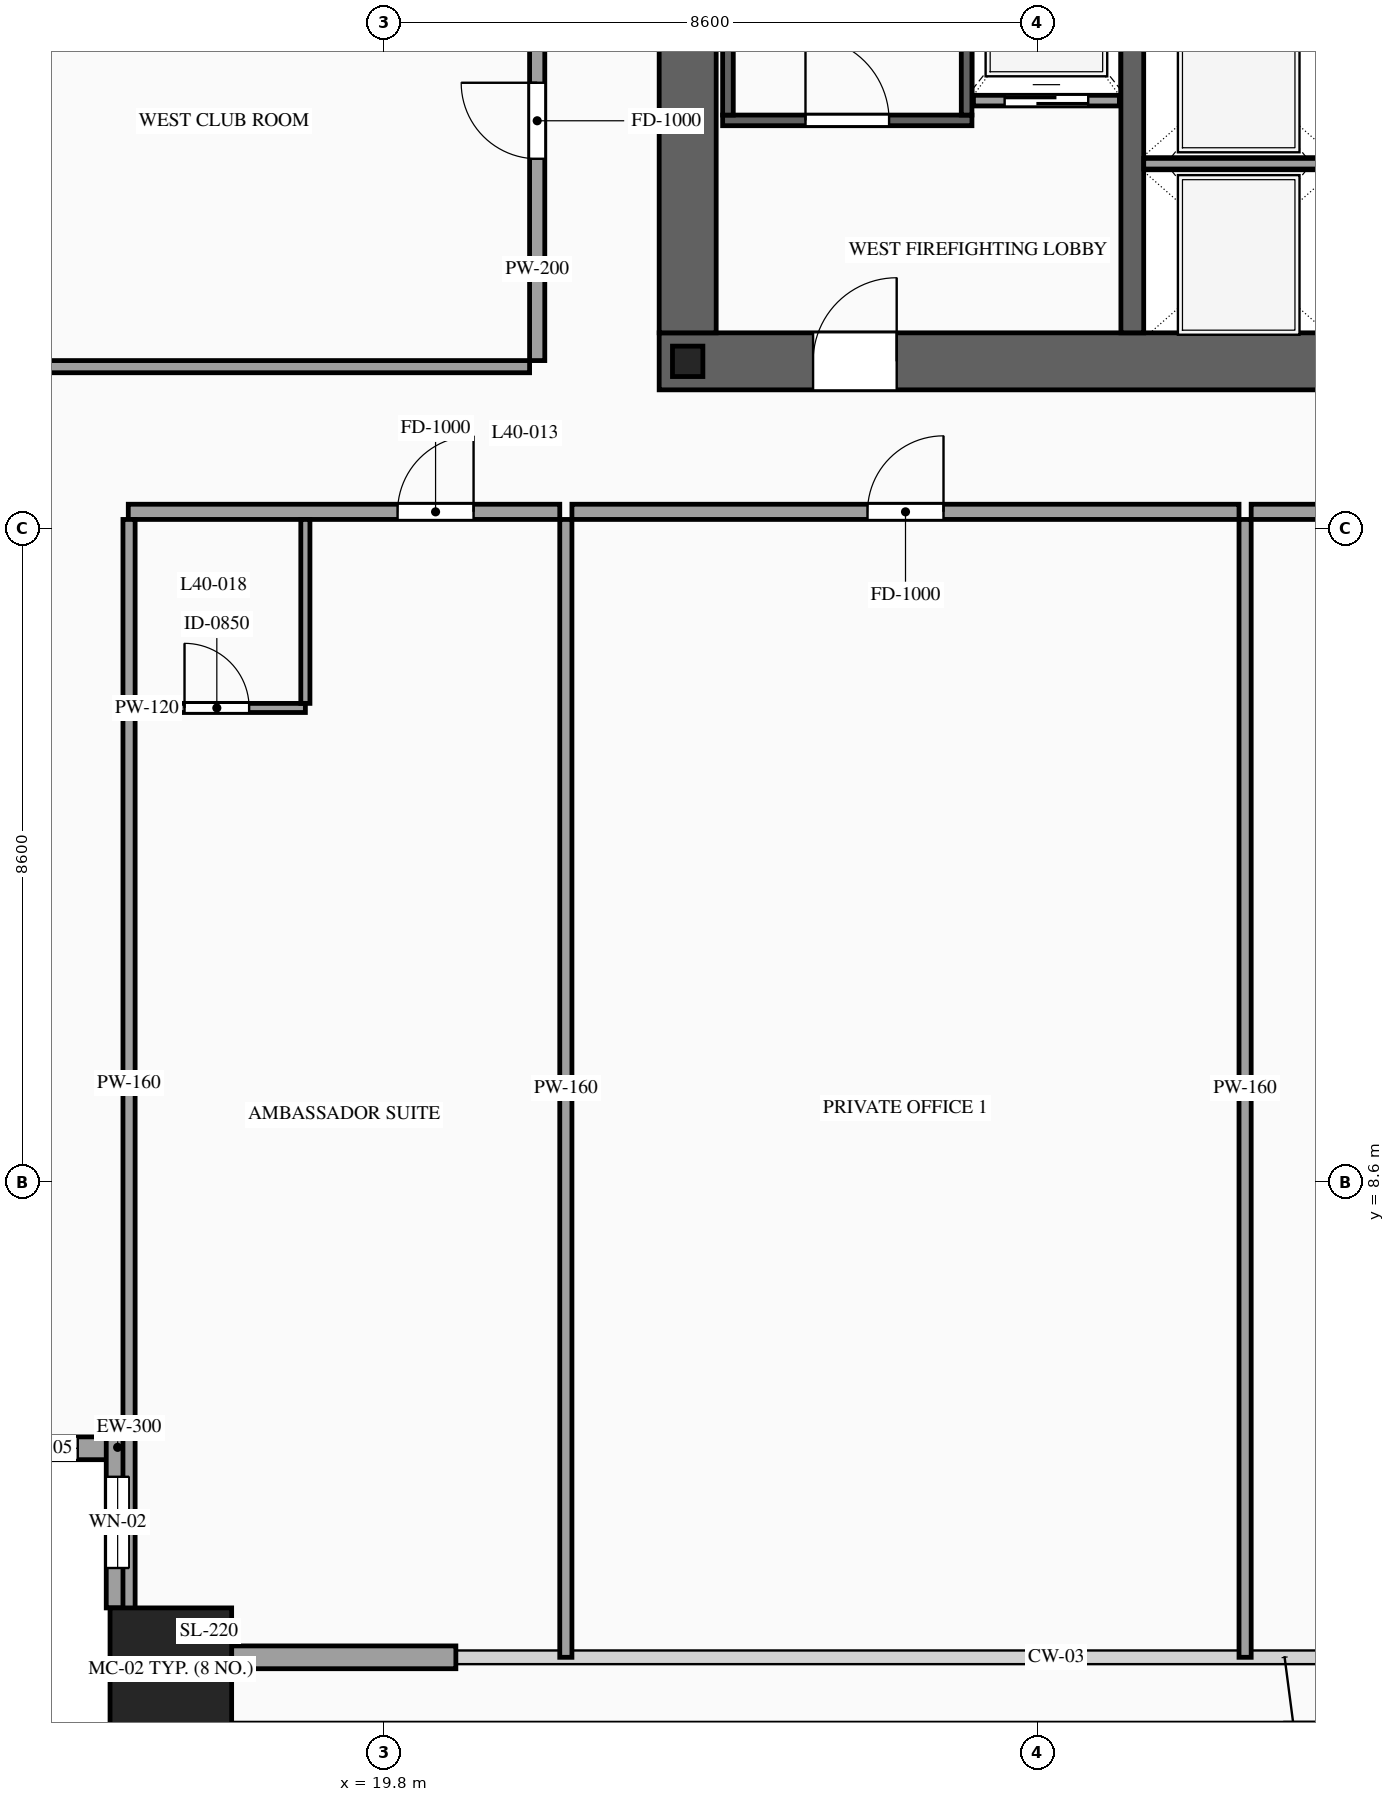
"""IFC4 building model, lengths in metres.
Left out: names, types, materials, properties, quantities, classifications, styles, units other than length and angle.
Written with IfcOpenShell. Run it as: python <this file> out.ifc"""

import sys

from ifc_helpers import new_model, si_unit, direction, frame, frame_2d, origin, origin_2d, place, context, subcontext, project, spatial, rectangle, hollow_rectangle, i_section, extrude, source, transform, mapped, element, fill, save


model = new_model("IFC4")
c1 = context("Model", 3, precision=1e-05, world=origin(), true_north=direction((0.0, 1.0)))
c2 = subcontext(c1, "Body", "Model", "MODEL_VIEW")
j1 = project(units=[si_unit("LENGTHUNIT", "METRE"), si_unit("PLANEANGLEUNIT", "RADIAN")], contexts=[c1])
p1 = place(None, origin())
s1 = spatial("IfcSite", under=j1, at=p1, CompositionType="ELEMENT")
p2 = place(p1, origin())
s2 = spatial("IfcBuilding", under=s1, at=p2, CompositionType="ELEMENT")
p3 = place(p2, frame((0.0, 0.0, 152.4)))
s3 = spatial("IfcBuildingStorey", under=s2, at=p3, CompositionType="ELEMENT", Elevation=152.4)
p4 = place(p3, frame((23.425, 19.4, 0.0), z_axis=(0.0, 0.0, 1.0), x_axis=(1.0, 0.0, 0.0)))
e1 = element("IfcWall", 1, at=p4, inside=s3, PredefinedType="SHEAR", context=c2, shape_type="SweptSolid", body=[
    extrude(rectangle(XDim=27.15, YDim=0.75, at=frame_2d((13.575, 0.0))), origin(), (0.0, 0.0, 1.0), 3.6),
])
p5 = place(p4, frame((2.025, 0.0, 0.0)))
e2 = element("IfcOpeningElement", 2, at=p5, cuts=e1, PredefinedType="OPENING", context=c2, shape_type="SweptSolid", body=[
    extrude(rectangle(XDim=1.1, YDim=2.2, at=frame_2d((0.55, 1.1))), frame((0.0, 0.39, 0.0), z_axis=(0.0, -1.0, 0.0), x_axis=(1.0, 0.0, 0.0)), (0.0, 0.0, 1.0), 0.78),
])
p6 = place(p4, frame((9.925, 0.0, 0.0)))
e3 = element("IfcOpeningElement", 3, at=p6, cuts=e1, PredefinedType="OPENING", context=c2, shape_type="SweptSolid", body=[
    extrude(rectangle(XDim=1.1, YDim=2.2, at=frame_2d((0.55, 1.1))), frame((0.0, 0.39, 0.0), z_axis=(0.0, -1.0, 0.0), x_axis=(1.0, 0.0, 0.0)), (0.0, 0.0, 1.0), 0.78),
])
p7 = place(p4, frame((23.125, 0.0, 0.0)))
e4 = element("IfcOpeningElement", 4, at=p7, cuts=e1, PredefinedType="OPENING", context=c2, shape_type="SweptSolid", body=[
    extrude(rectangle(XDim=1.1, YDim=2.2, at=frame_2d((0.55, 1.1))), frame((0.0, 0.39, 0.0), z_axis=(0.0, -1.0, 0.0), x_axis=(1.0, 0.0, 0.0)), (0.0, 0.0, 1.0), 0.78),
])
p8 = place(p4, frame((19.745, 0.0, 0.0)))
e5 = element("IfcOpeningElement", 5, at=p8, cuts=e1, PredefinedType="OPENING", context=c2, shape_type="SweptSolid", body=[
    extrude(rectangle(XDim=0.9, YDim=2.15, at=frame_2d((0.45, 1.075))), frame((0.0, 0.39, 0.0), z_axis=(0.0, -1.0, 0.0), x_axis=(1.0, 0.0, 0.0)), (0.0, 0.0, 1.0), 0.78),
])
p9 = place(p4, frame((18.305, 0.0, 0.0)))
e6 = element("IfcOpeningElement", 6, at=p9, cuts=e1, PredefinedType="OPENING", context=c2, shape_type="SweptSolid", body=[
    extrude(rectangle(XDim=0.9, YDim=2.15, at=frame_2d((0.45, 1.075))), frame((0.0, 0.39, 0.0), z_axis=(0.0, -1.0, 0.0), x_axis=(1.0, 0.0, 0.0)), (0.0, 0.0, 1.0), 0.78),
])
m1 = source(origin(), c2, "Body", "SweptSolid", [
    extrude(rectangle(XDim=12.05, YDim=0.75, at=frame_2d((6.025, 0.0))), origin(), (0.0, 0.0, 1.0), 3.6),
])
p10 = place(p3, frame((23.8, 19.775, 0.0), z_axis=(0.0, 0.0, 1.0), x_axis=(0.0, 1.0, 0.0)))
e7 = element("IfcWall", 7, at=p10, inside=s3, PredefinedType="SHEAR", context=c2, shape_type="MappedRepresentation", body=[
    mapped(m1, transform((0.0, 0.0, 0.0), scale=1.0)),
])
m2 = source(origin(), c2, "Body", "SweptSolid", [
    extrude(rectangle(XDim=12.05, YDim=0.3, at=frame_2d((6.025, 0.0))), origin(), (0.0, 0.0, 1.0), 3.6),
])
p11 = place(p3, frame((29.65, 19.775, 0.0), z_axis=(0.0, 0.0, 1.0), x_axis=(0.0, 1.0, 0.0)))
e8 = element("IfcWall", 8, at=p11, inside=s3, PredefinedType="SOLIDWALL", context=c2, shape_type="MappedRepresentation", body=[
    mapped(m2, transform((0.0, 0.0, 0.0), scale=1.0)),
])
m3 = source(origin(), c2, "Body", "SweptSolid", [
    extrude(i_section(OverallWidth=0.4, OverallDepth=0.4, WebThickness=0.013, FlangeThickness=0.021, at=origin_2d()), origin(), (0.0, 0.0, 1.0), 3.6),
])
p12 = place(p3, frame((23.8, 19.4, 0.0), z_axis=(0.0, 0.0, 1.0), x_axis=(1.0, 0.0, 0.0)))
e9 = element("IfcColumn", 9, at=p12, inside=s3, PredefinedType="COLUMN", context=c2, shape_type="MappedRepresentation", body=[
    mapped(m3, transform((0.0, 0.0, 0.0), scale=1.0)),
])
m4 = source(origin(), c2, "Body", "SweptSolid", [
    extrude(hollow_rectangle(XDim=1.6, YDim=1.6, WallThickness=0.07, at=origin_2d()), origin(), (0.0, 0.0, 1.0), 3.6),
])
p13 = place(p3, frame((17.0, 2.2, 0.0), z_axis=(0.0, 0.0, 1.0), x_axis=(1.0, 0.0, 0.0)))
e10 = element("IfcColumn", 10, at=p13, inside=s3, PredefinedType="COLUMN", context=c2, shape_type="MappedRepresentation", body=[
    mapped(m4, transform((0.0, 0.0, 0.0), scale=1.0)),
])
p14 = place(p3, frame((14.2, 5.1, 0.0), z_axis=(0.0, 0.0, 1.0), x_axis=(1.0, 0.0, 0.0)))
e11 = element("IfcWall", 11, at=p14, inside=s3, PredefinedType="SOLIDWALL", context=c2, shape_type="SweptSolid", body=[
    extrude(rectangle(XDim=2.25, YDim=0.3, at=frame_2d((1.125, 0.0))), origin(), (0.0, 0.0, 1.0), 3.38),
])
p15 = place(p14, frame((0.675, 0.0, 0.85)))
e12 = element("IfcOpeningElement", 12, at=p15, cuts=e11, PredefinedType="OPENING", context=c2, shape_type="SweptSolid", body=[
    extrude(rectangle(XDim=0.9, YDim=1.5, at=frame_2d((0.45, 0.75))), frame((0.0, 0.165, 0.0), z_axis=(0.0, -1.0, 0.0), x_axis=(1.0, 0.0, 0.0)), (0.0, 0.0, 1.0), 0.33),
])
p16 = place(p3, frame((16.3, 5.25, 0.0), z_axis=(0.0, 0.0, 1.0), x_axis=(0.0, -1.0, 0.0)))
e13 = element("IfcWall", 13, at=p16, inside=s3, PredefinedType="SOLIDWALL", context=c2, shape_type="SweptSolid", body=[
    extrude(rectangle(XDim=2.25, YDim=0.3, at=frame_2d((1.125, 0.0))), origin(), (0.0, 0.0, 1.0), 3.38),
])
p17 = place(p16, frame((0.525, 0.0, 0.85)))
e14 = element("IfcOpeningElement", 14, at=p17, cuts=e13, PredefinedType="OPENING", context=c2, shape_type="SweptSolid", body=[
    extrude(rectangle(XDim=1.2, YDim=2.1, at=frame_2d((0.6, 1.05))), frame((0.0, 0.165, 0.0), z_axis=(0.0, -1.0, 0.0), x_axis=(1.0, 0.0, 0.0)), (0.0, 0.0, 1.0), 0.33),
])
m5 = source(origin(), c2, "Body", "SweptSolid", [
    extrude(rectangle(XDim=2.95, YDim=0.3, at=frame_2d((1.475, 0.0))), origin(), (0.0, 0.0, 1.0), 2.775),
])
p18 = place(p3, frame((17.8, 2.35, 0.0), z_axis=(0.0, 0.0, 1.0), x_axis=(1.0, 0.0, 0.0)))
e15 = element("IfcWall", 15, at=p18, inside=s3, PredefinedType="SOLIDWALL", context=c2, shape_type="MappedRepresentation", body=[
    mapped(m5, transform((0.0, 0.0, 0.0), scale=1.0)),
])
p19 = place(p3, frame((27.56, 22.83, 0.0), z_axis=(0.0, 0.0, 1.0), x_axis=(1.0, 0.0, 0.0)))
e16 = element("IfcWall", 16, at=p19, inside=s3, PredefinedType="SOLIDWALL", context=c2, shape_type="SweptSolid", body=[
    extrude(rectangle(XDim=1.92, YDim=0.14, at=frame_2d((0.96, 0.0))), origin(), (0.0, 0.0, 1.0), 3.38),
])
p20 = place(p19, frame((0.41, 0.0, 0.0)))
e17 = element("IfcOpeningElement", 17, at=p20, cuts=e16, PredefinedType="OPENING", context=c2, shape_type="SweptSolid", body=[
    extrude(rectangle(XDim=1.1, YDim=2.2, at=frame_2d((0.55, 1.1))), frame((0.0, 0.085, 0.0), z_axis=(0.0, -1.0, 0.0), x_axis=(1.0, 0.0, 0.0)), (0.0, 0.0, 1.0), 0.17),
])
m6 = source(origin(), c2, "Body", "SweptSolid", [
    extrude(rectangle(XDim=2.5, YDim=0.14, at=frame_2d((1.25, 0.0))), origin(), (0.0, 0.0, 1.0), 3.38),
])
p21 = place(p3, frame((29.8, 22.0, 0.0), z_axis=(0.0, 0.0, 1.0), x_axis=(1.0, 0.0, 0.0)))
e18 = element("IfcWall", 18, at=p21, inside=s3, PredefinedType="SOLIDWALL", context=c2, shape_type="MappedRepresentation", body=[
    mapped(m6, transform((0.0, 0.0, 0.0), scale=1.0)),
])
p22 = place(p3, frame((24.26, 22.57, 0.0), z_axis=(0.0, 0.0, 1.0), x_axis=(1.0, 0.0, 0.0)))
e19 = element("IfcWall", 19, at=p22, inside=s3, PredefinedType="SOLIDWALL", context=c2, shape_type="SweptSolid", body=[
    extrude(rectangle(XDim=3.28, YDim=0.14, at=frame_2d((1.64, 0.0))), origin(), (0.0, 0.0, 1.0), 3.38),
])
p23 = place(p22, frame((1.09, 0.0, 0.0)))
e20 = element("IfcOpeningElement", 20, at=p23, cuts=e19, PredefinedType="OPENING", context=c2, shape_type="SweptSolid", body=[
    extrude(rectangle(XDim=1.1, YDim=2.2, at=frame_2d((0.55, 1.1))), frame((0.0, 0.085, 0.0), z_axis=(0.0, -1.0, 0.0), x_axis=(1.0, 0.0, 0.0)), (0.0, 0.0, 1.0), 0.17),
])
m7 = source(origin(), c2, "Body", "SweptSolid", [
    extrude(rectangle(XDim=8.94, YDim=0.14, at=frame_2d((4.47, 0.0))), origin(), (0.0, 0.0, 1.0), 3.38),
])
for number, where, z_axis, x_axis in (
    (21, (24.33, 22.64, 0.0), (0.0, 0.0, 1.0), (0.0, 1.0, 0.0)),
    (22, (27.47, 22.64, 0.0), (0.0, 0.0, 1.0), (0.0, 1.0, 0.0)),
):
    element("IfcWall", number, at=place(p3, frame(where, z_axis=z_axis, x_axis=x_axis)), inside=s3, PredefinedType="SOLIDWALL", context=c2, shape_type="MappedRepresentation", body=[
        mapped(m7, transform((0.0, 0.0, 0.0), scale=1.0)),
    ])
p24 = place(p3, frame((16.44, 17.42, 0.0), z_axis=(0.0, 0.0, 1.0), x_axis=(1.0, 0.0, 0.0)))
e23 = element("IfcWall", 23, at=p24, inside=s3, PredefinedType="PARTITIONING", context=c2, shape_type="SweptSolid", body=[
    extrude(rectangle(XDim=5.677, YDim=0.2, at=frame_2d((2.838, 0.0))), origin(), (0.0, 0.0, 1.0), 3.38),
])
p25 = place(p24, frame((3.543, 0.0, 0.0)))
e24 = element("IfcOpeningElement", 24, at=p25, cuts=e23, PredefinedType="OPENING", context=c2, shape_type="SweptSolid", body=[
    extrude(rectangle(XDim=1.0, YDim=2.2, at=frame_2d((0.5, 1.1))), frame((0.0, 0.115, 0.0), z_axis=(0.0, -1.0, 0.0), x_axis=(1.0, 0.0, 0.0)), (0.0, 0.0, 1.0), 0.23),
])
m8 = source(origin(), c2, "Body", "SweptSolid", [
    extrude(rectangle(XDim=14.97, YDim=0.16, at=frame_2d((7.485, 0.0))), origin(), (0.0, 0.0, 1.0), 3.38),
])
p26 = place(p3, frame((22.197, 2.35, 0.0), z_axis=(0.0, 0.0, 1.0), x_axis=(0.0, 1.0, 0.0)))
e25 = element("IfcWall", 25, at=p26, inside=s3, PredefinedType="PARTITIONING", context=c2, shape_type="MappedRepresentation", body=[
    mapped(m8, transform((0.0, 0.0, 0.0), scale=1.0)),
])
p27 = place(p3, frame((16.44, 14.84, 0.0), z_axis=(0.0, 0.0, 1.0), x_axis=(1.0, 0.0, 0.0)))
e26 = element("IfcWall", 26, at=p27, inside=s3, PredefinedType="PARTITIONING", context=c2, shape_type="SweptSolid", body=[
    extrude(rectangle(XDim=2.33, YDim=0.12, at=frame_2d((1.165, 0.0))), origin(), (0.0, 0.0, 1.0), 3.38),
])
p28 = place(p27, frame((0.74, 0.0, 0.0)))
e27 = element("IfcOpeningElement", 27, at=p28, cuts=e26, PredefinedType="OPENING", context=c2, shape_type="SweptSolid", body=[
    extrude(rectangle(XDim=0.85, YDim=2.1, at=frame_2d((0.425, 1.05))), frame((0.0, 0.075, 0.0), z_axis=(0.0, -1.0, 0.0), x_axis=(1.0, 0.0, 0.0)), (0.0, 0.0, 1.0), 0.15),
])
m9 = source(origin(), c2, "Body", "SweptSolid", [
    extrude(rectangle(XDim=2.42, YDim=0.12, at=frame_2d((1.21, 0.0))), origin(), (0.0, 0.0, 1.0), 3.38),
])
p29 = place(p3, frame((18.77, 14.9, 0.0), z_axis=(0.0, 0.0, 1.0), x_axis=(0.0, 1.0, 0.0)))
e28 = element("IfcWall", 28, at=p29, inside=s3, PredefinedType="PARTITIONING", context=c2, shape_type="MappedRepresentation", body=[
    mapped(m9, transform((0.0, 0.0, 0.0), scale=1.0)),
])
p30 = place(p3, frame((22.277, 17.42, 0.0), z_axis=(0.0, 0.0, 1.0), x_axis=(1.0, 0.0, 0.0)))
e29 = element("IfcWall", 29, at=p30, inside=s3, PredefinedType="PARTITIONING", context=c2, shape_type="SweptSolid", body=[
    extrude(rectangle(XDim=8.777, YDim=0.2, at=frame_2d((4.388, 0.0))), origin(), (0.0, 0.0, 1.0), 3.38),
])
p31 = place(p30, frame((3.889, 0.0, 0.0)))
e30 = element("IfcOpeningElement", 30, at=p31, cuts=e29, PredefinedType="OPENING", context=c2, shape_type="SweptSolid", body=[
    extrude(rectangle(XDim=1.0, YDim=2.2, at=frame_2d((0.5, 1.1))), frame((0.0, 0.115, 0.0), z_axis=(0.0, -1.0, 0.0), x_axis=(1.0, 0.0, 0.0)), (0.0, 0.0, 1.0), 0.23),
])
p32 = place(p3, frame((31.134, 2.35, 0.0), z_axis=(0.0, 0.0, 1.0), x_axis=(0.0, 1.0, 0.0)))
e31 = element("IfcWall", 31, at=p32, inside=s3, PredefinedType="PARTITIONING", context=c2, shape_type="MappedRepresentation", body=[
    mapped(m8, transform((0.0, 0.0, 0.0), scale=1.0)),
])
p33 = place(p3, frame((31.214, 17.42, 0.0), z_axis=(0.0, 0.0, 1.0), x_axis=(1.0, 0.0, 0.0)))
e32 = element("IfcWall", 32, at=p33, inside=s3, PredefinedType="PARTITIONING", context=c2, shape_type="SweptSolid", body=[
    extrude(rectangle(XDim=4.061, YDim=0.2, at=frame_2d((2.03, 0.0))), origin(), (0.0, 0.0, 1.0), 3.38),
])
p34 = place(p33, frame((1.531, 0.0, 0.0)))
e33 = element("IfcOpeningElement", 33, at=p34, cuts=e32, PredefinedType="OPENING", context=c2, shape_type="SweptSolid", body=[
    extrude(rectangle(XDim=1.0, YDim=2.2, at=frame_2d((0.5, 1.1))), frame((0.0, 0.115, 0.0), z_axis=(0.0, -1.0, 0.0), x_axis=(1.0, 0.0, 0.0)), (0.0, 0.0, 1.0), 0.23),
])
m10 = source(origin(), c2, "Body", "SweptSolid", [
    extrude(rectangle(XDim=14.82, YDim=0.16, at=frame_2d((7.41, 0.0))), origin(), (0.0, 0.0, 1.0), 3.38),
])
p35 = place(p3, frame((16.45, 2.5, 0.0), z_axis=(0.0, 0.0, 1.0), x_axis=(0.0, 1.0, 0.0)))
e34 = element("IfcWall", 34, at=p35, inside=s3, PredefinedType="PARTITIONING", context=c2, shape_type="MappedRepresentation", body=[
    mapped(m10, transform((0.0, 0.0, 0.0), scale=1.0)),
])
p36 = place(p3, frame((21.82, 19.41, 0.0), z_axis=(0.0, 0.0, 1.0), x_axis=(0.0, 1.0, 0.0)))
e35 = element("IfcWall", 35, at=p36, inside=s3, PredefinedType="PARTITIONING", context=c2, shape_type="SweptSolid", body=[
    extrude(rectangle(XDim=6.31, YDim=0.2, at=frame_2d((3.155, 0.0))), origin(), (0.0, 0.0, 1.0), 3.38),
])
p37 = place(p36, frame((2.655, 0.0, 0.0)))
e36 = element("IfcOpeningElement", 36, at=p37, cuts=e35, PredefinedType="OPENING", context=c2, shape_type="SweptSolid", body=[
    extrude(rectangle(XDim=1.0, YDim=2.2, at=frame_2d((0.5, 1.1))), frame((0.0, 0.115, 0.0), z_axis=(0.0, -1.0, 0.0), x_axis=(1.0, 0.0, 0.0)), (0.0, 0.0, 1.0), 0.23),
])
m11 = source(origin(), c2, "Body", "SweptSolid", [
    extrude(rectangle(XDim=8.17, YDim=0.16, at=frame_2d((4.085, 0.0))), origin(), (0.0, 0.0, 1.0), 2.875),
])
p38 = place(p3, frame((13.55, 19.33, 0.0), z_axis=(0.0, 0.0, 1.0), x_axis=(1.0, 0.0, 0.0)))
e37 = element("IfcWall", 37, at=p38, inside=s3, PredefinedType="PARTITIONING", context=c2, shape_type="MappedRepresentation", body=[
    mapped(m11, transform((0.0, 0.0, 0.0), scale=1.0)),
])
m12 = source(origin(), c2, "Body", "SweptSolid", [
    extrude(rectangle(XDim=0.9, YDim=1.5, at=frame_2d((0.45, 0.75))), frame((0.0, 0.03, 0.0), z_axis=(0.0, -1.0, 0.0), x_axis=(1.0, 0.0, 0.0)), (0.0, 0.0, 1.0), 0.06),
])
p39 = place(p15, origin())
e38 = element("IfcWindow", 38, at=p39, inside=s3, PartitioningType="SINGLE_PANEL", PredefinedType="WINDOW", context=c2, shape_type="MappedRepresentation", body=[
    mapped(m12, transform((0.0, 0.0, 0.0), scale=1.0)),
])
fill(e12, e38)
m13 = source(origin(), c2, "Body", "SweptSolid", [
    extrude(rectangle(XDim=1.2, YDim=2.1, at=frame_2d((0.6, 1.05))), frame((0.0, 0.03, 0.0), z_axis=(0.0, -1.0, 0.0), x_axis=(1.0, 0.0, 0.0)), (0.0, 0.0, 1.0), 0.06),
])
p40 = place(p17, origin())
e39 = element("IfcWindow", 39, at=p40, inside=s3, PartitioningType="SINGLE_PANEL", PredefinedType="WINDOW", context=c2, shape_type="MappedRepresentation", body=[
    mapped(m13, transform((0.0, 0.0, 0.0), scale=1.0)),
])
fill(e14, e39)
m14 = source(origin(), c2, "Body", "SweptSolid", [
    extrude(rectangle(XDim=1.1, YDim=2.2, at=frame_2d((0.55, 1.1))), frame((0.0, 0.025, 0.0), z_axis=(0.0, -1.0, 0.0), x_axis=(1.0, 0.0, 0.0)), (0.0, 0.0, 1.0), 0.05),
])
p41 = place(p20, origin())
e40 = element("IfcDoor", 40, at=p41, inside=s3, OperationType="SLIDING_TO_LEFT", PredefinedType="DOOR", context=c2, shape_type="MappedRepresentation", body=[
    mapped(m14, transform((0.0, 0.0, 0.0), scale=1.0)),
])
fill(e17, e40)
m15 = source(origin(), c2, "Body", "SweptSolid", [
    extrude(rectangle(XDim=1.1, YDim=2.2, at=frame_2d((0.55, 1.1))), frame((0.0, 0.025, 0.0), z_axis=(0.0, -1.0, 0.0), x_axis=(1.0, 0.0, 0.0)), (0.0, 0.0, 1.0), 0.05),
])
p42 = place(p23, origin())
e41 = element("IfcDoor", 41, at=p42, inside=s3, OperationType="SINGLE_SWING_LEFT", PredefinedType="DOOR", context=c2, shape_type="MappedRepresentation", body=[
    mapped(m15, transform((0.0, 0.0, 0.0), scale=1.0)),
])
fill(e20, e41)
p43 = place(p5, origin())
e42 = element("IfcDoor", 42, at=p43, inside=s3, OperationType="SINGLE_SWING_RIGHT", PredefinedType="DOOR", context=c2, shape_type="MappedRepresentation", body=[
    mapped(m15, transform((0.0, 0.0, 0.0), scale=1.0)),
])
fill(e2, e42)
m16 = source(origin(), c2, "Body", "SweptSolid", [
    extrude(rectangle(XDim=1.0, YDim=2.2, at=frame_2d((0.5, 1.1))), frame((0.0, 0.025, 0.0), z_axis=(0.0, -1.0, 0.0), x_axis=(1.0, 0.0, 0.0)), (0.0, 0.0, 1.0), 0.05),
])
p44 = place(p25, origin())
e43 = element("IfcDoor", 43, at=p44, inside=s3, OperationType="SINGLE_SWING_RIGHT", PredefinedType="DOOR", context=c2, shape_type="MappedRepresentation", body=[
    mapped(m16, transform((0.0, 0.0, 0.0), scale=1.0)),
])
fill(e24, e43)
m17 = source(origin(), c2, "Body", "SweptSolid", [
    extrude(rectangle(XDim=0.85, YDim=2.1, at=frame_2d((0.425, 1.05))), frame((0.0, 0.025, 0.0), z_axis=(0.0, -1.0, 0.0), x_axis=(1.0, 0.0, 0.0)), (0.0, 0.0, 1.0), 0.05),
])
p45 = place(p28, origin())
e44 = element("IfcDoor", 44, at=p45, inside=s3, OperationType="SINGLE_SWING_LEFT", PredefinedType="DOOR", context=c2, shape_type="MappedRepresentation", body=[
    mapped(m17, transform((0.0, 0.0, 0.0), scale=1.0)),
])
fill(e27, e44)
p46 = place(p31, origin())
e45 = element("IfcDoor", 45, at=p46, inside=s3, OperationType="SINGLE_SWING_RIGHT", PredefinedType="DOOR", context=c2, shape_type="MappedRepresentation", body=[
    mapped(m16, transform((0.0, 0.0, 0.0), scale=1.0)),
])
fill(e30, e45)
p47 = place(p37, origin())
e46 = element("IfcDoor", 46, at=p47, inside=s3, OperationType="SINGLE_SWING_RIGHT", PredefinedType="DOOR", context=c2, shape_type="MappedRepresentation", body=[
    mapped(m16, transform((0.0, 0.0, 0.0), scale=1.0)),
])
fill(e36, e46)
save(model, sys.argv[1])
